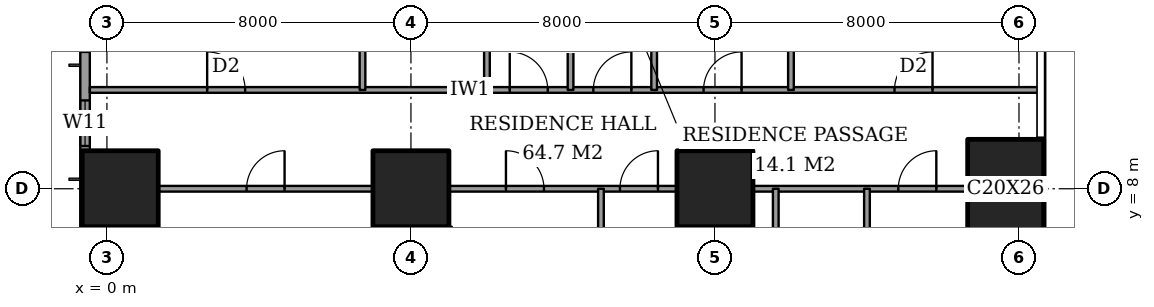
"""IFC4 building model, lengths in metres.
Left out: names, types, materials, properties, quantities, classifications, styles, units other than length and angle.
Written with IfcOpenShell. Run it as: python <this file> out.ifc"""

import sys

from ifc_helpers import new_model, si_unit, direction, frame, frame_2d, origin, origin_2d, place, context, subcontext, project, spatial, rectangle, extrude, element, fill, save


model = new_model("IFC4")
c1 = context("Model", 3, precision=1e-05, world=origin(), true_north=direction((0.0, 1.0)))
c2 = subcontext(c1, "Body", "Model", "MODEL_VIEW")
j1 = project(units=[si_unit("LENGTHUNIT", "METRE"), si_unit("PLANEANGLEUNIT", "RADIAN")], contexts=[c1])
p1 = place(None, origin())
s1 = spatial("IfcSite", under=j1, at=p1, CompositionType="ELEMENT")
p2 = place(p1, origin())
s2 = spatial("IfcBuilding", under=s1, at=p2, CompositionType="ELEMENT")
p3 = place(p2, frame((0.0, 0.0, 139.4)))
s3 = spatial("IfcBuildingStorey", under=s2, at=p3, CompositionType="ELEMENT", Elevation=139.4)
for number, where, z_axis, x_axis in (
    (1, (0.35, 8.0, 0.0), (0.0, 0.0, 1.0), (1.0, 0.0, 0.0)),
    (2, (8.0, 8.0, 0.0), (0.0, 0.0, 1.0), (1.0, 0.0, 0.0)),
    (3, (16.0, 8.0, 0.0), (0.0, 0.0, 1.0), (1.0, 0.0, 0.0)),
):
    element("IfcColumn", number, at=place(p3, frame(where, z_axis=z_axis, x_axis=x_axis)), inside=s3, PredefinedType="COLUMN", context=c2, shape_type="SweptSolid", body=[
        extrude(rectangle(XDim=2.0, YDim=2.0, at=origin_2d()), origin(), (0.0, 0.0, 1.0), 3.6),
    ])
p4 = place(p3, frame((23.65, 8.0, 0.0), z_axis=(0.0, 0.0, 1.0), x_axis=(1.0, 0.0, 0.0)))
e4 = element("IfcColumn", 4, at=p4, inside=s3, PredefinedType="COLUMN", context=c2, shape_type="SweptSolid", body=[
    extrude(rectangle(XDim=2.0, YDim=2.6, at=origin_2d()), origin(), (0.0, 0.0, 1.0), 3.6),
])
p5 = place(p3, frame((-0.575, 44.825, 0.0), z_axis=(0.0, 0.0, 1.0), x_axis=(0.0, -1.0, 0.0)))
e5 = element("IfcWall", 5, at=p5, inside=s3, PredefinedType="SOLIDWALL", context=c2, shape_type="SweptSolid", body=[
    extrude(rectangle(XDim=41.65, YDim=0.25, at=frame_2d((20.825, 0.0))), origin(), (0.0, 0.0, 1.0), 3.6),
])
p6 = place(p5, frame((0.775, 0.0, 0.4)))
e6 = element("IfcOpeningElement", 6, at=p6, cuts=e5, PredefinedType="OPENING", context=c2, shape_type="SweptSolid", body=[
    extrude(rectangle(XDim=2.4, YDim=2.2, at=frame_2d((1.2, 1.1))), frame((0.0, 0.135, 0.0), z_axis=(0.0, -1.0, 0.0), x_axis=(1.0, 0.0, 0.0)), (0.0, 0.0, 1.0), 0.27),
])
p7 = place(p5, frame((6.1, 0.0, 0.4)))
e7 = element("IfcOpeningElement", 7, at=p7, cuts=e5, PredefinedType="OPENING", context=c2, shape_type="SweptSolid", body=[
    extrude(rectangle(XDim=1.2, YDim=2.2, at=frame_2d((0.6, 1.1))), frame((0.0, 0.135, 0.0), z_axis=(0.0, -1.0, 0.0), x_axis=(1.0, 0.0, 0.0)), (0.0, 0.0, 1.0), 0.27),
])
p8 = place(p5, frame((8.425, 0.0, 0.4)))
e8 = element("IfcOpeningElement", 8, at=p8, cuts=e5, PredefinedType="OPENING", context=c2, shape_type="SweptSolid", body=[
    extrude(rectangle(XDim=2.4, YDim=2.2, at=frame_2d((1.2, 1.1))), frame((0.0, 0.135, 0.0), z_axis=(0.0, -1.0, 0.0), x_axis=(1.0, 0.0, 0.0)), (0.0, 0.0, 1.0), 0.27),
])
p9 = place(p5, frame((15.625, 0.0, 0.4)))
e9 = element("IfcOpeningElement", 9, at=p9, cuts=e5, PredefinedType="OPENING", context=c2, shape_type="SweptSolid", body=[
    extrude(rectangle(XDim=2.4, YDim=2.2, at=frame_2d((1.2, 1.1))), frame((0.0, 0.135, 0.0), z_axis=(0.0, -1.0, 0.0), x_axis=(1.0, 0.0, 0.0)), (0.0, 0.0, 1.0), 0.27),
])
p10 = place(p5, frame((23.625, 0.0, 0.4)))
e10 = element("IfcOpeningElement", 10, at=p10, cuts=e5, PredefinedType="OPENING", context=c2, shape_type="SweptSolid", body=[
    extrude(rectangle(XDim=2.4, YDim=2.2, at=frame_2d((1.2, 1.1))), frame((0.0, 0.135, 0.0), z_axis=(0.0, -1.0, 0.0), x_axis=(1.0, 0.0, 0.0)), (0.0, 0.0, 1.0), 0.27),
])
p11 = place(p5, frame((30.825, 0.0, 0.4)))
e11 = element("IfcOpeningElement", 11, at=p11, cuts=e5, PredefinedType="OPENING", context=c2, shape_type="SweptSolid", body=[
    extrude(rectangle(XDim=2.4, YDim=2.2, at=frame_2d((1.2, 1.1))), frame((0.0, 0.135, 0.0), z_axis=(0.0, -1.0, 0.0), x_axis=(1.0, 0.0, 0.0)), (0.0, 0.0, 1.0), 0.27),
])
p12 = place(p5, frame((34.5, 0.0, 0.4)))
e12 = element("IfcOpeningElement", 12, at=p12, cuts=e5, PredefinedType="OPENING", context=c2, shape_type="SweptSolid", body=[
    extrude(rectangle(XDim=1.2, YDim=2.2, at=frame_2d((0.6, 1.1))), frame((0.0, 0.135, 0.0), z_axis=(0.0, -1.0, 0.0), x_axis=(1.0, 0.0, 0.0)), (0.0, 0.0, 1.0), 0.27),
])
p13 = place(p5, frame((38.475, 0.0, 0.4)))
e13 = element("IfcOpeningElement", 13, at=p13, cuts=e5, PredefinedType="OPENING", context=c2, shape_type="SweptSolid", body=[
    extrude(rectangle(XDim=2.4, YDim=2.2, at=frame_2d((1.2, 1.1))), frame((0.0, 0.135, 0.0), z_axis=(0.0, -1.0, 0.0), x_axis=(1.0, 0.0, 0.0)), (0.0, 0.0, 1.0), 0.27),
])
p14 = place(p3, frame((1.35, 8.0, 0.0), z_axis=(0.0, 0.0, 1.0), x_axis=(1.0, 0.0, 0.0)))
e14 = element("IfcWall", 14, at=p14, inside=s3, PredefinedType="PARTITIONING", context=c2, shape_type="SweptSolid", body=[
    extrude(rectangle(XDim=5.65, YDim=0.15, at=frame_2d((2.825, 0.0))), origin(), (0.0, 0.0, 1.0), 3.35),
])
p15 = place(p14, frame((2.325, 0.0, 0.0)))
e15 = element("IfcOpeningElement", 15, at=p15, cuts=e14, PredefinedType="OPENING", context=c2, shape_type="SweptSolid", body=[
    extrude(rectangle(XDim=1.0, YDim=2.1, at=frame_2d((0.5, 1.05))), frame((0.0, 0.085, 0.0), z_axis=(0.0, -1.0, 0.0), x_axis=(1.0, 0.0, 0.0)), (0.0, 0.0, 1.0), 0.17),
])
p16 = place(p3, frame((9.0, 8.0, 0.0), z_axis=(0.0, 0.0, 1.0), x_axis=(1.0, 0.0, 0.0)))
e16 = element("IfcWall", 16, at=p16, inside=s3, PredefinedType="PARTITIONING", context=c2, shape_type="SweptSolid", body=[
    extrude(rectangle(XDim=6.0, YDim=0.15, at=frame_2d((3.0, 0.0))), origin(), (0.0, 0.0, 1.0), 3.35),
])
p17 = place(p16, frame((1.5, 0.0, 0.0)))
e17 = element("IfcOpeningElement", 17, at=p17, cuts=e16, PredefinedType="OPENING", context=c2, shape_type="SweptSolid", body=[
    extrude(rectangle(XDim=1.0, YDim=2.1, at=frame_2d((0.5, 1.05))), frame((0.0, 0.085, 0.0), z_axis=(0.0, -1.0, 0.0), x_axis=(1.0, 0.0, 0.0)), (0.0, 0.0, 1.0), 0.17),
])
p18 = place(p16, frame((4.5, 0.0, 0.0)))
e18 = element("IfcOpeningElement", 18, at=p18, cuts=e16, PredefinedType="OPENING", context=c2, shape_type="SweptSolid", body=[
    extrude(rectangle(XDim=1.0, YDim=2.1, at=frame_2d((0.5, 1.05))), frame((0.0, 0.085, 0.0), z_axis=(0.0, -1.0, 0.0), x_axis=(1.0, 0.0, 0.0)), (0.0, 0.0, 1.0), 0.17),
])
p19 = place(p3, frame((17.0, 8.0, 0.0), z_axis=(0.0, 0.0, 1.0), x_axis=(1.0, 0.0, 0.0)))
e19 = element("IfcWall", 19, at=p19, inside=s3, PredefinedType="PARTITIONING", context=c2, shape_type="SweptSolid", body=[
    extrude(rectangle(XDim=5.65, YDim=0.15, at=frame_2d((2.825, 0.0))), origin(), (0.0, 0.0, 1.0), 3.35),
])
p20 = place(p19, frame((3.825, 0.0, 0.0)))
e20 = element("IfcOpeningElement", 20, at=p20, cuts=e19, PredefinedType="OPENING", context=c2, shape_type="SweptSolid", body=[
    extrude(rectangle(XDim=1.0, YDim=2.1, at=frame_2d((0.5, 1.05))), frame((0.0, 0.085, 0.0), z_axis=(0.0, -1.0, 0.0), x_axis=(1.0, 0.0, 0.0)), (0.0, 0.0, 1.0), 0.17),
])
p21 = place(p3, frame((-0.45, 10.6, 0.0), z_axis=(0.0, 0.0, 1.0), x_axis=(1.0, 0.0, 0.0)))
e21 = element("IfcWall", 21, at=p21, inside=s3, PredefinedType="PARTITIONING", context=c2, shape_type="SweptSolid", body=[
    extrude(rectangle(XDim=25.011, YDim=0.15, at=frame_2d((12.505, 0.0))), origin(), (0.0, 0.0, 1.0), 3.35),
])
p22 = place(p21, frame((13.25, 0.0, 0.0)))
e22 = element("IfcOpeningElement", 22, at=p22, cuts=e21, PredefinedType="OPENING", context=c2, shape_type="SweptSolid", body=[
    extrude(rectangle(XDim=1.0, YDim=2.1, at=frame_2d((0.5, 1.05))), frame((0.0, 0.085, 0.0), z_axis=(0.0, -1.0, 0.0), x_axis=(1.0, 0.0, 0.0)), (0.0, 0.0, 1.0), 0.17),
])
p23 = place(p21, frame((3.087, 0.0, 0.0)))
e23 = element("IfcOpeningElement", 23, at=p23, cuts=e21, PredefinedType="OPENING", context=c2, shape_type="SweptSolid", body=[
    extrude(rectangle(XDim=1.0, YDim=2.1, at=frame_2d((0.5, 1.05))), frame((0.0, 0.085, 0.0), z_axis=(0.0, -1.0, 0.0), x_axis=(1.0, 0.0, 0.0)), (0.0, 0.0, 1.0), 0.17),
])
p24 = place(p21, frame((11.05, 0.0, 0.0)))
e24 = element("IfcOpeningElement", 24, at=p24, cuts=e21, PredefinedType="OPENING", context=c2, shape_type="SweptSolid", body=[
    extrude(rectangle(XDim=1.0, YDim=2.1, at=frame_2d((0.5, 1.05))), frame((0.0, 0.085, 0.0), z_axis=(0.0, -1.0, 0.0), x_axis=(1.0, 0.0, 0.0)), (0.0, 0.0, 1.0), 0.17),
])
p25 = place(p21, frame((16.15, 0.0, 0.0)))
e25 = element("IfcOpeningElement", 25, at=p25, cuts=e21, PredefinedType="OPENING", context=c2, shape_type="SweptSolid", body=[
    extrude(rectangle(XDim=1.0, YDim=2.1, at=frame_2d((0.5, 1.05))), frame((0.0, 0.085, 0.0), z_axis=(0.0, -1.0, 0.0), x_axis=(1.0, 0.0, 0.0)), (0.0, 0.0, 1.0), 0.17),
])
p26 = place(p21, frame((21.175, 0.0, 0.0)))
e26 = element("IfcOpeningElement", 26, at=p26, cuts=e21, PredefinedType="OPENING", context=c2, shape_type="SweptSolid", body=[
    extrude(rectangle(XDim=1.0, YDim=2.1, at=frame_2d((0.5, 1.05))), frame((0.0, 0.085, 0.0), z_axis=(0.0, -1.0, 0.0), x_axis=(1.0, 0.0, 0.0)), (0.0, 0.0, 1.0), 0.17),
])
p27 = place(p3, frame((6.725, 10.6, 0.0), z_axis=(0.0, 0.0, 1.0), x_axis=(0.0, 1.0, 0.0)))
e27 = element("IfcWall", 27, at=p27, inside=s3, PredefinedType="PARTITIONING", context=c2, shape_type="SweptSolid", body=[
    extrude(rectangle(XDim=4.2, YDim=0.15, at=frame_2d((2.1, 0.0))), origin(), (0.0, 0.0, 1.0), 3.35),
])
p28 = place(p27, frame((1.2, 0.0, 0.0)))
e28 = element("IfcOpeningElement", 28, at=p28, cuts=e27, PredefinedType="OPENING", context=c2, shape_type="SweptSolid", body=[
    extrude(rectangle(XDim=0.9, YDim=2.1, at=frame_2d((0.45, 1.05))), frame((0.0, 0.085, 0.0), z_axis=(0.0, -1.0, 0.0), x_axis=(1.0, 0.0, 0.0)), (0.0, 0.0, 1.0), 0.17),
])
p29 = place(p3, frame((10.0, 10.6, 0.0), z_axis=(0.0, 0.0, 1.0), x_axis=(0.0, 1.0, 0.0)))
e29 = element("IfcWall", 29, at=p29, inside=s3, PredefinedType="PARTITIONING", context=c2, shape_type="SweptSolid", body=[
    extrude(rectangle(XDim=11.0, YDim=0.15, at=frame_2d((5.5, 0.0))), origin(), (0.0, 0.0, 1.0), 3.35),
])
p30 = place(p29, frame((8.2, 0.0, 0.0)))
e30 = element("IfcOpeningElement", 30, at=p30, cuts=e29, PredefinedType="OPENING", context=c2, shape_type="SweptSolid", body=[
    extrude(rectangle(XDim=1.0, YDim=2.1, at=frame_2d((0.5, 1.05))), frame((0.0, 0.085, 0.0), z_axis=(0.0, -1.0, 0.0), x_axis=(1.0, 0.0, 0.0)), (0.0, 0.0, 1.0), 0.17),
])
p31 = place(p3, frame((12.2, 10.6, 0.0), z_axis=(0.0, 0.0, 1.0), x_axis=(0.0, 1.0, 0.0)))
e31 = element("IfcWall", 31, at=p31, inside=s3, PredefinedType="PARTITIONING", context=c2, shape_type="SweptSolid", body=[
    extrude(rectangle(XDim=6.4, YDim=0.15, at=frame_2d((3.2, 0.0))), origin(), (0.0, 0.0, 1.0), 3.35),
])
p32 = place(p3, frame((13.0, -0.45, 0.0), z_axis=(0.0, 0.0, 1.0), x_axis=(0.0, 1.0, 0.0)))
e32 = element("IfcWall", 32, at=p32, inside=s3, PredefinedType="PARTITIONING", context=c2, shape_type="SweptSolid", body=[
    extrude(rectangle(XDim=8.45, YDim=0.15, at=frame_2d((4.225, 0.0))), origin(), (0.0, 0.0, 1.0), 3.35),
])
p33 = place(p3, frame((14.4, 10.6, 0.0), z_axis=(0.0, 0.0, 1.0), x_axis=(0.0, 1.0, 0.0)))
e33 = element("IfcWall", 33, at=p33, inside=s3, PredefinedType="PARTITIONING", context=c2, shape_type="SweptSolid", body=[
    extrude(rectangle(XDim=6.4, YDim=0.15, at=frame_2d((3.2, 0.0))), origin(), (0.0, 0.0, 1.0), 3.35),
])
p34 = place(p3, frame((17.6, -0.45, 0.0), z_axis=(0.0, 0.0, 1.0), x_axis=(0.0, 1.0, 0.0)))
e34 = element("IfcWall", 34, at=p34, inside=s3, PredefinedType="PARTITIONING", context=c2, shape_type="SweptSolid", body=[
    extrude(rectangle(XDim=8.45, YDim=0.15, at=frame_2d((4.225, 0.0))), origin(), (0.0, 0.0, 1.0), 3.35),
])
p35 = place(p3, frame((18.0, 10.6, 0.0), z_axis=(0.0, 0.0, 1.0), x_axis=(0.0, 1.0, 0.0)))
e35 = element("IfcWall", 35, at=p35, inside=s3, PredefinedType="PARTITIONING", context=c2, shape_type="SweptSolid", body=[
    extrude(rectangle(XDim=6.4, YDim=0.15, at=frame_2d((3.2, 0.0))), origin(), (0.0, 0.0, 1.0), 3.35),
])
p36 = place(p3, frame((20.0, -0.45, 0.0), z_axis=(0.0, 0.0, 1.0), x_axis=(0.0, 1.0, 0.0)))
e36 = element("IfcWall", 36, at=p36, inside=s3, PredefinedType="PARTITIONING", context=c2, shape_type="SweptSolid", body=[
    extrude(rectangle(XDim=8.45, YDim=0.15, at=frame_2d((4.225, 0.0))), origin(), (0.0, 0.0, 1.0), 3.35),
])
p37 = place(p36, frame((3.775, 0.0, 0.0)))
e37 = element("IfcOpeningElement", 37, at=p37, cuts=e36, PredefinedType="OPENING", context=c2, shape_type="SweptSolid", body=[
    extrude(rectangle(XDim=0.9, YDim=2.1, at=frame_2d((0.45, 1.05))), frame((0.0, 0.085, 0.0), z_axis=(0.0, -1.0, 0.0), x_axis=(1.0, 0.0, 0.0)), (0.0, 0.0, 1.0), 0.17),
])
p38 = place(p12, origin())
e38 = element("IfcWindow", 38, at=p38, inside=s3, PartitioningType="SINGLE_PANEL", PredefinedType="WINDOW", context=c2, shape_type="SweptSolid", body=[
    extrude(rectangle(XDim=1.2, YDim=2.2, at=frame_2d((0.6, 1.1))), frame((0.0, 0.03, 0.0), z_axis=(0.0, -1.0, 0.0), x_axis=(1.0, 0.0, 0.0)), (0.0, 0.0, 1.0), 0.06),
])
fill(e12, e38)
p39 = place(p15, origin())
e39 = element("IfcDoor", 39, at=p39, inside=s3, OperationType="SINGLE_SWING_LEFT", PredefinedType="DOOR", context=c2, shape_type="SweptSolid", body=[
    extrude(rectangle(XDim=1.0, YDim=2.1, at=frame_2d((0.5, 1.05))), frame((0.0, 0.025, 0.0), z_axis=(0.0, -1.0, 0.0), x_axis=(1.0, 0.0, 0.0)), (0.0, 0.0, 1.0), 0.05),
])
fill(e15, e39)
p40 = place(p17, origin())
e40 = element("IfcDoor", 40, at=p40, inside=s3, OperationType="SINGLE_SWING_RIGHT", PredefinedType="DOOR", context=c2, shape_type="SweptSolid", body=[
    extrude(rectangle(XDim=1.0, YDim=2.1, at=frame_2d((0.5, 1.05))), frame((0.0, 0.025, 0.0), z_axis=(0.0, -1.0, 0.0), x_axis=(1.0, 0.0, 0.0)), (0.0, 0.0, 1.0), 0.05),
])
fill(e17, e40)
p41 = place(p18, origin())
e41 = element("IfcDoor", 41, at=p41, inside=s3, OperationType="SINGLE_SWING_LEFT", PredefinedType="DOOR", context=c2, shape_type="SweptSolid", body=[
    extrude(rectangle(XDim=1.0, YDim=2.1, at=frame_2d((0.5, 1.05))), frame((0.0, 0.025, 0.0), z_axis=(0.0, -1.0, 0.0), x_axis=(1.0, 0.0, 0.0)), (0.0, 0.0, 1.0), 0.05),
])
fill(e18, e41)
p42 = place(p20, origin())
e42 = element("IfcDoor", 42, at=p42, inside=s3, OperationType="SINGLE_SWING_LEFT", PredefinedType="DOOR", context=c2, shape_type="SweptSolid", body=[
    extrude(rectangle(XDim=1.0, YDim=2.1, at=frame_2d((0.5, 1.05))), frame((0.0, 0.025, 0.0), z_axis=(0.0, -1.0, 0.0), x_axis=(1.0, 0.0, 0.0)), (0.0, 0.0, 1.0), 0.05),
])
fill(e20, e42)
p43 = place(p22, origin())
e43 = element("IfcDoor", 43, at=p43, inside=s3, OperationType="SINGLE_SWING_LEFT", PredefinedType="DOOR", context=c2, shape_type="SweptSolid", body=[
    extrude(rectangle(XDim=1.0, YDim=2.1, at=frame_2d((0.5, 1.05))), frame((0.0, 0.025, 0.0), z_axis=(0.0, -1.0, 0.0), x_axis=(1.0, 0.0, 0.0)), (0.0, 0.0, 1.0), 0.05),
])
fill(e22, e43)
p44 = place(p23, origin())
e44 = element("IfcDoor", 44, at=p44, inside=s3, OperationType="SINGLE_SWING_RIGHT", PredefinedType="DOOR", context=c2, shape_type="SweptSolid", body=[
    extrude(rectangle(XDim=1.0, YDim=2.1, at=frame_2d((0.5, 1.05))), frame((0.0, 0.025, 0.0), z_axis=(0.0, -1.0, 0.0), x_axis=(1.0, 0.0, 0.0)), (0.0, 0.0, 1.0), 0.05),
])
fill(e23, e44)
p45 = place(p24, origin())
e45 = element("IfcDoor", 45, at=p45, inside=s3, OperationType="SINGLE_SWING_RIGHT", PredefinedType="DOOR", context=c2, shape_type="SweptSolid", body=[
    extrude(rectangle(XDim=1.0, YDim=2.1, at=frame_2d((0.5, 1.05))), frame((0.0, 0.025, 0.0), z_axis=(0.0, -1.0, 0.0), x_axis=(1.0, 0.0, 0.0)), (0.0, 0.0, 1.0), 0.05),
])
fill(e24, e45)
p46 = place(p25, origin())
e46 = element("IfcDoor", 46, at=p46, inside=s3, OperationType="SINGLE_SWING_LEFT", PredefinedType="DOOR", context=c2, shape_type="SweptSolid", body=[
    extrude(rectangle(XDim=1.0, YDim=2.1, at=frame_2d((0.5, 1.05))), frame((0.0, 0.025, 0.0), z_axis=(0.0, -1.0, 0.0), x_axis=(1.0, 0.0, 0.0)), (0.0, 0.0, 1.0), 0.05),
])
fill(e25, e46)
p47 = place(p26, origin())
e47 = element("IfcDoor", 47, at=p47, inside=s3, OperationType="SINGLE_SWING_LEFT", PredefinedType="DOOR", context=c2, shape_type="SweptSolid", body=[
    extrude(rectangle(XDim=1.0, YDim=2.1, at=frame_2d((0.5, 1.05))), frame((0.0, 0.025, 0.0), z_axis=(0.0, -1.0, 0.0), x_axis=(1.0, 0.0, 0.0)), (0.0, 0.0, 1.0), 0.05),
])
fill(e26, e47)
save(model, sys.argv[1])
